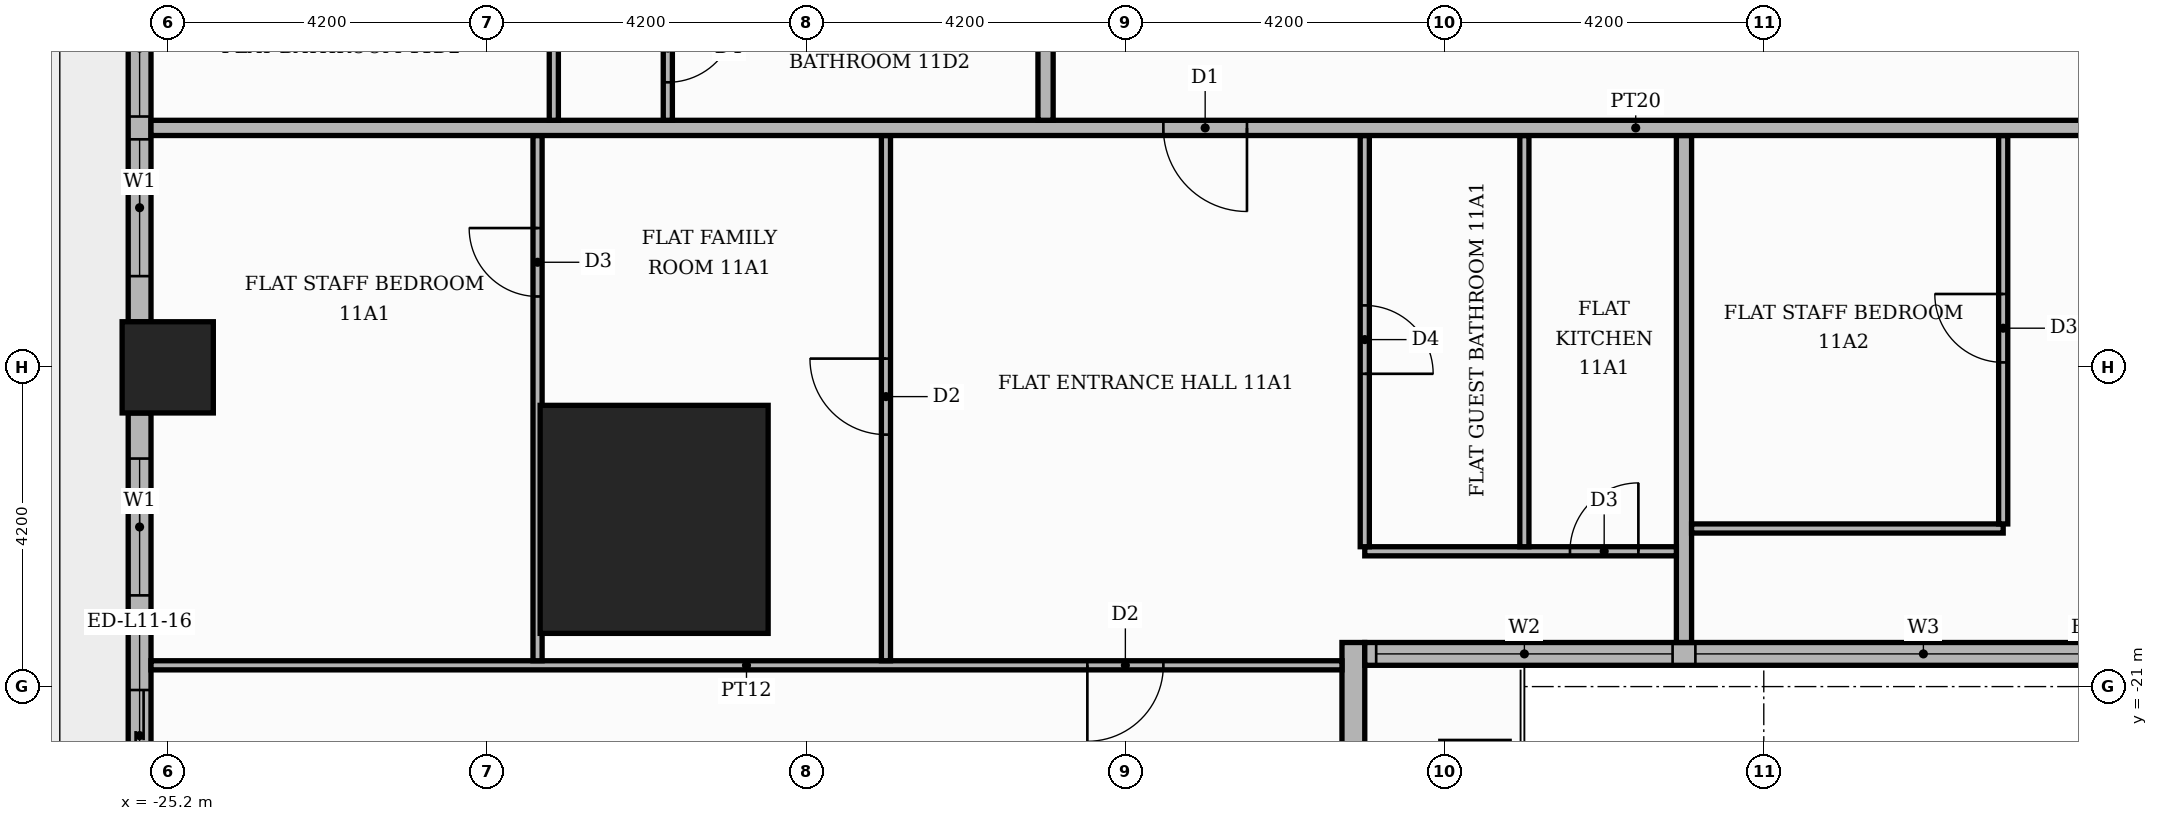
"""IFC4 building model, lengths in metres.
Left out: names, types, materials, properties, quantities, classifications, styles, units other than length and angle.
Written with IfcOpenShell. Run it as: python <this file> out.ifc"""

import sys

from ifc_helpers import new_model, si_unit, direction, frame, frame_2d, origin, origin_2d, place, context, subcontext, project, spatial, rectangle, extrude, element, fill, save


model = new_model("IFC4")
c1 = context("Model", 3, precision=1e-05, world=origin(), true_north=direction((0.0, 1.0)))
c2 = subcontext(c1, "Body", "Model", "MODEL_VIEW")
j1 = project(units=[si_unit("LENGTHUNIT", "METRE"), si_unit("PLANEANGLEUNIT", "RADIAN")], contexts=[c1])
p1 = place(None, origin())
s1 = spatial("IfcSite", under=j1, at=p1, CompositionType="ELEMENT")
p2 = place(p1, origin())
s2 = spatial("IfcBuilding", under=s1, at=p2, CompositionType="ELEMENT")
p3 = place(p2, frame((0.0, 0.0, 50.4)))
s3 = spatial("IfcBuildingStorey", under=s2, at=p3, CompositionType="ELEMENT", Elevation=50.4)
p4 = place(p3, frame((-18.8, -18.8, 0.0), z_axis=(0.0, 0.0, 1.0), x_axis=(1.0, 0.0, 0.0)))
e1 = element("IfcColumn", 1, at=p4, inside=s3, PredefinedType="COLUMN", context=c2, shape_type="SweptSolid", body=[
    extrude(rectangle(XDim=3.0, YDim=3.0, at=origin_2d()), origin(), (0.0, 0.0, 1.0), 3.9),
])
p5 = place(p3, frame((-25.2, -16.8, 0.0), z_axis=(0.0, 0.0, 1.0), x_axis=(1.0, 0.0, 0.0)))
e2 = element("IfcColumn", 2, at=p5, inside=s3, PredefinedType="COLUMN", context=c2, shape_type="SweptSolid", body=[
    extrude(rectangle(XDim=1.2, YDim=1.2, at=origin_2d()), origin(), (0.0, 0.0, 1.0), 3.9),
])
p6 = place(p3, frame((-25.57, -9.0, 0.0), z_axis=(0.0, 0.0, 1.0), x_axis=(0.0, -1.0, 0.0)))
e3 = element("IfcWall", 3, at=p6, inside=s3, PredefinedType="STANDARD", context=c2, shape_type="SweptSolid", body=[
    extrude(rectangle(XDim=7.2, YDim=0.3, at=frame_2d((3.6, 0.0))), origin(), (0.0, 0.0, 1.0), 3.48),
])
p7 = place(p6, frame((0.6, 0.0, 0.9)))
e4 = element("IfcOpeningElement", 4, at=p7, cuts=e3, PredefinedType="OPENING", context=c2, shape_type="SweptSolid", body=[
    extrude(rectangle(XDim=1.8, YDim=2.1, at=frame_2d((0.9, 1.05))), frame((0.0, 0.16, 0.0), z_axis=(0.0, -1.0, 0.0), x_axis=(1.0, 0.0, 0.0)), (0.0, 0.0, 1.0), 0.32),
])
p8 = place(p6, frame((2.7, 0.0, 0.9)))
e5 = element("IfcOpeningElement", 5, at=p8, cuts=e3, PredefinedType="OPENING", context=c2, shape_type="SweptSolid", body=[
    extrude(rectangle(XDim=1.8, YDim=2.1, at=frame_2d((0.9, 1.05))), frame((0.0, 0.16, 0.0), z_axis=(0.0, -1.0, 0.0), x_axis=(1.0, 0.0, 0.0)), (0.0, 0.0, 1.0), 0.32),
])
p9 = place(p6, frame((4.8, 0.0, 0.9)))
e6 = element("IfcOpeningElement", 6, at=p9, cuts=e3, PredefinedType="OPENING", context=c2, shape_type="SweptSolid", body=[
    extrude(rectangle(XDim=1.8, YDim=2.1, at=frame_2d((0.9, 1.05))), frame((0.0, 0.16, 0.0), z_axis=(0.0, -1.0, 0.0), x_axis=(1.0, 0.0, 0.0)), (0.0, 0.0, 1.0), 0.32),
])
p10 = place(p3, frame((-25.57, -17.4, 0.0), z_axis=(0.0, 0.0, 1.0), x_axis=(0.0, -1.0, 0.0)))
e7 = element("IfcWall", 7, at=p10, inside=s3, PredefinedType="STANDARD", context=c2, shape_type="SweptSolid", body=[
    extrude(rectangle(XDim=5.32, YDim=0.3, at=frame_2d((2.66, 0.0))), origin(), (0.0, 0.0, 1.0), 3.48),
])
p11 = place(p10, frame((0.6, 0.0, 0.9)))
e8 = element("IfcOpeningElement", 8, at=p11, cuts=e7, PredefinedType="OPENING", context=c2, shape_type="SweptSolid", body=[
    extrude(rectangle(XDim=1.8, YDim=2.1, at=frame_2d((0.9, 1.05))), frame((0.0, 0.16, 0.0), z_axis=(0.0, -1.0, 0.0), x_axis=(1.0, 0.0, 0.0)), (0.0, 0.0, 1.0), 0.32),
])
p12 = place(p10, frame((3.645, 0.0, 0.0)))
e9 = element("IfcOpeningElement", 9, at=p12, cuts=e7, PredefinedType="OPENING", context=c2, shape_type="SweptSolid", body=[
    extrude(rectangle(XDim=1.2, YDim=2.4, at=frame_2d((0.6, 1.2))), frame((0.0, 0.16, 0.0), z_axis=(0.0, -1.0, 0.0), x_axis=(1.0, 0.0, 0.0)), (0.0, 0.0, 1.0), 0.32),
])
p13 = place(p3, frame((-9.6, -25.42, 0.0), z_axis=(0.0, 0.0, 1.0), x_axis=(0.0, 1.0, 0.0)))
e10 = element("IfcWall", 10, at=p13, inside=s3, PredefinedType="STANDARD", context=c2, shape_type="SweptSolid", body=[
    extrude(rectangle(XDim=5.0, YDim=0.3, at=frame_2d((2.5, 0.0))), origin(), (0.0, 0.0, 1.0), 3.48),
])
p14 = place(p13, frame((1.42, 0.0, 0.0)))
e11 = element("IfcOpeningElement", 11, at=p14, cuts=e10, PredefinedType="OPENING", context=c2, shape_type="SweptSolid", body=[
    extrude(rectangle(XDim=1.8, YDim=2.4, at=frame_2d((0.9, 1.2))), frame((0.0, 0.16, 0.0), z_axis=(0.0, -1.0, 0.0), x_axis=(1.0, 0.0, 0.0)), (0.0, 0.0, 1.0), 0.32),
])
p15 = place(p3, frame((-9.45, -20.57, 0.0), z_axis=(0.0, 0.0, 1.0), x_axis=(1.0, 0.0, 0.0)))
e12 = element("IfcWall", 12, at=p15, inside=s3, PredefinedType="STANDARD", context=c2, shape_type="SweptSolid", body=[
    extrude(rectangle(XDim=19.2, YDim=0.3, at=frame_2d((9.6, 0.0))), origin(), (0.0, 0.0, 1.0), 3.48),
])
p16 = place(p15, frame((0.15, 0.0, 0.9)))
e13 = element("IfcOpeningElement", 13, at=p16, cuts=e12, PredefinedType="OPENING", context=c2, shape_type="SweptSolid", body=[
    extrude(rectangle(XDim=3.9, YDim=2.1, at=frame_2d((1.95, 1.05))), frame((0.0, 0.16, 0.0), z_axis=(0.0, -1.0, 0.0), x_axis=(1.0, 0.0, 0.0)), (0.0, 0.0, 1.0), 0.32),
])
p17 = place(p15, frame((4.35, 0.0, 0.9)))
e14 = element("IfcOpeningElement", 14, at=p17, cuts=e12, PredefinedType="OPENING", context=c2, shape_type="SweptSolid", body=[
    extrude(rectangle(XDim=6.0, YDim=2.1, at=frame_2d((3.0, 1.05))), frame((0.0, 0.16, 0.0), z_axis=(0.0, -1.0, 0.0), x_axis=(1.0, 0.0, 0.0)), (0.0, 0.0, 1.0), 0.32),
])
p18 = place(p15, frame((10.65, 0.0, 0.9)))
e15 = element("IfcOpeningElement", 15, at=p18, cuts=e12, PredefinedType="OPENING", context=c2, shape_type="SweptSolid", body=[
    extrude(rectangle(XDim=6.0, YDim=2.1, at=frame_2d((3.0, 1.05))), frame((0.0, 0.16, 0.0), z_axis=(0.0, -1.0, 0.0), x_axis=(1.0, 0.0, 0.0)), (0.0, 0.0, 1.0), 0.32),
])
p19 = place(p15, frame((16.95, 0.0, 0.9)))
e16 = element("IfcOpeningElement", 16, at=p19, cuts=e12, PredefinedType="OPENING", context=c2, shape_type="SweptSolid", body=[
    extrude(rectangle(XDim=1.8, YDim=2.1, at=frame_2d((0.9, 1.05))), frame((0.0, 0.16, 0.0), z_axis=(0.0, -1.0, 0.0), x_axis=(1.0, 0.0, 0.0)), (0.0, 0.0, 1.0), 0.32),
])
p20 = place(p3, frame((-25.42, -20.72, 0.0), z_axis=(0.0, 0.0, 1.0), x_axis=(1.0, 0.0, 0.0)))
e17 = element("IfcWall", 17, at=p20, inside=s3, PredefinedType="PARTITIONING", context=c2, shape_type="SweptSolid", body=[
    extrude(rectangle(XDim=15.67, YDim=0.12, at=frame_2d((7.835, 0.0))), origin(), (0.0, 0.0, 1.0), 3.48),
])
p21 = place(p20, frame((12.32, 0.0, 0.0)))
e18 = element("IfcOpeningElement", 18, at=p21, cuts=e17, PredefinedType="OPENING", context=c2, shape_type="SweptSolid", body=[
    extrude(rectangle(XDim=1.0, YDim=2.1, at=frame_2d((0.5, 1.05))), frame((0.0, 0.07, 0.0), z_axis=(0.0, -1.0, 0.0), x_axis=(1.0, 0.0, 0.0)), (0.0, 0.0, 1.0), 0.14),
])
p22 = place(p3, frame((-5.25, -20.42, 0.0), z_axis=(0.0, 0.0, 1.0), x_axis=(0.0, 1.0, 0.0)))
e19 = element("IfcWall", 19, at=p22, inside=s3, PredefinedType="PARTITIONING", context=c2, shape_type="SweptSolid", body=[
    extrude(rectangle(XDim=6.67, YDim=0.2, at=frame_2d((3.335, 0.0))), origin(), (0.0, 0.0, 1.0), 3.48),
])
p23 = place(p3, frame((-20.334, -20.66, 0.0), z_axis=(0.0, 0.0, 1.0), x_axis=(0.0, 1.0, 0.0)))
e20 = element("IfcWall", 20, at=p23, inside=s3, PredefinedType="PARTITIONING", context=c2, shape_type="SweptSolid", body=[
    extrude(rectangle(XDim=6.91, YDim=0.12, at=frame_2d((3.455, 0.0))), origin(), (0.0, 0.0, 1.0), 3.48),
])
p24 = place(p23, frame((4.792, 0.0, 0.0)))
e21 = element("IfcOpeningElement", 21, at=p24, cuts=e20, PredefinedType="OPENING", context=c2, shape_type="SweptSolid", body=[
    extrude(rectangle(XDim=0.9, YDim=2.1, at=frame_2d((0.45, 1.05))), frame((0.0, 0.07, 0.0), z_axis=(0.0, -1.0, 0.0), x_axis=(1.0, 0.0, 0.0)), (0.0, 0.0, 1.0), 0.14),
])
p25 = place(p3, frame((-15.75, -20.66, 0.0), z_axis=(0.0, 0.0, 1.0), x_axis=(0.0, 1.0, 0.0)))
e22 = element("IfcWall", 22, at=p25, inside=s3, PredefinedType="PARTITIONING", context=c2, shape_type="SweptSolid", body=[
    extrude(rectangle(XDim=6.91, YDim=0.12, at=frame_2d((3.455, 0.0))), origin(), (0.0, 0.0, 1.0), 3.48),
])
p26 = place(p25, frame((2.975, 0.0, 0.0)))
e23 = element("IfcOpeningElement", 23, at=p26, cuts=e22, PredefinedType="OPENING", context=c2, shape_type="SweptSolid", body=[
    extrude(rectangle(XDim=1.0, YDim=2.1, at=frame_2d((0.5, 1.05))), frame((0.0, 0.07, 0.0), z_axis=(0.0, -1.0, 0.0), x_axis=(1.0, 0.0, 0.0)), (0.0, 0.0, 1.0), 0.14),
])
p27 = place(p3, frame((-9.45, -19.22, 0.0), z_axis=(0.0, 0.0, 1.0), x_axis=(1.0, 0.0, 0.0)))
e24 = element("IfcWall", 24, at=p27, inside=s3, PredefinedType="PARTITIONING", context=c2, shape_type="SweptSolid", body=[
    extrude(rectangle(XDim=4.1, YDim=0.12, at=frame_2d((2.05, 0.0))), origin(), (0.0, 0.0, 1.0), 3.48),
])
p28 = place(p27, frame((2.7, 0.0, 0.0)))
e25 = element("IfcOpeningElement", 25, at=p28, cuts=e24, PredefinedType="OPENING", context=c2, shape_type="SweptSolid", body=[
    extrude(rectangle(XDim=0.9, YDim=2.1, at=frame_2d((0.45, 1.05))), frame((0.0, 0.07, 0.0), z_axis=(0.0, -1.0, 0.0), x_axis=(1.0, 0.0, 0.0)), (0.0, 0.0, 1.0), 0.14),
])
p29 = place(p3, frame((-9.45, -19.16, 0.0), z_axis=(0.0, 0.0, 1.0), x_axis=(0.0, 1.0, 0.0)))
e26 = element("IfcWall", 26, at=p29, inside=s3, PredefinedType="PARTITIONING", context=c2, shape_type="SweptSolid", body=[
    extrude(rectangle(XDim=5.41, YDim=0.12, at=frame_2d((2.705, 0.0))), origin(), (0.0, 0.0, 1.0), 3.48),
])
p30 = place(p29, frame((2.275, 0.0, 0.0)))
e27 = element("IfcOpeningElement", 27, at=p30, cuts=e26, PredefinedType="OPENING", context=c2, shape_type="SweptSolid", body=[
    extrude(rectangle(XDim=0.9, YDim=2.1, at=frame_2d((0.45, 1.05))), frame((0.0, 0.07, 0.0), z_axis=(0.0, -1.0, 0.0), x_axis=(1.0, 0.0, 0.0)), (0.0, 0.0, 1.0), 0.14),
])
p31 = place(p3, frame((-7.35, -19.16, 0.0), z_axis=(0.0, 0.0, 1.0), x_axis=(0.0, 1.0, 0.0)))
e28 = element("IfcWall", 28, at=p31, inside=s3, PredefinedType="PARTITIONING", context=c2, shape_type="SweptSolid", body=[
    extrude(rectangle(XDim=5.41, YDim=0.12, at=frame_2d((2.705, 0.0))), origin(), (0.0, 0.0, 1.0), 3.48),
])
p32 = place(p3, frame((-5.15, -18.92, 0.0), z_axis=(0.0, 0.0, 1.0), x_axis=(1.0, 0.0, 0.0)))
e29 = element("IfcWall", 29, at=p32, inside=s3, PredefinedType="PARTITIONING", context=c2, shape_type="SweptSolid", body=[
    extrude(rectangle(XDim=4.1, YDim=0.12, at=frame_2d((2.05, 0.0))), origin(), (0.0, 0.0, 1.0), 3.48),
])
p33 = place(p3, frame((-1.05, -18.86, 0.0), z_axis=(0.0, 0.0, 1.0), x_axis=(0.0, 1.0, 0.0)))
e30 = element("IfcWall", 30, at=p33, inside=s3, PredefinedType="PARTITIONING", context=c2, shape_type="SweptSolid", body=[
    extrude(rectangle(XDim=5.11, YDim=0.12, at=frame_2d((2.555, 0.0))), origin(), (0.0, 0.0, 1.0), 3.48),
])
p34 = place(p33, frame((2.125, 0.0, 0.0)))
e31 = element("IfcOpeningElement", 31, at=p34, cuts=e30, PredefinedType="OPENING", context=c2, shape_type="SweptSolid", body=[
    extrude(rectangle(XDim=0.9, YDim=2.1, at=frame_2d((0.45, 1.05))), frame((0.0, 0.07, 0.0), z_axis=(0.0, -1.0, 0.0), x_axis=(1.0, 0.0, 0.0)), (0.0, 0.0, 1.0), 0.14),
])
p35 = place(p3, frame((-25.42, -13.65, 0.0), z_axis=(0.0, 0.0, 1.0), x_axis=(1.0, 0.0, 0.0)))
e32 = element("IfcWall", 32, at=p35, inside=s3, PredefinedType="PARTITIONING", context=c2, shape_type="SweptSolid", body=[
    extrude(rectangle(XDim=39.07, YDim=0.2, at=frame_2d((19.535, 0.0))), origin(), (0.0, 0.0, 1.0), 3.48),
])
p36 = place(p35, frame((13.32, 0.0, 0.0)))
e33 = element("IfcOpeningElement", 33, at=p36, cuts=e32, PredefinedType="OPENING", context=c2, shape_type="SweptSolid", body=[
    extrude(rectangle(XDim=1.1, YDim=2.4, at=frame_2d((0.55, 1.2))), frame((0.0, 0.11, 0.0), z_axis=(0.0, -1.0, 0.0), x_axis=(1.0, 0.0, 0.0)), (0.0, 0.0, 1.0), 0.22),
])
p37 = place(p35, frame((25.92, 0.0, 0.0)))
e34 = element("IfcOpeningElement", 34, at=p37, cuts=e32, PredefinedType="OPENING", context=c2, shape_type="SweptSolid", body=[
    extrude(rectangle(XDim=1.1, YDim=2.4, at=frame_2d((0.55, 1.2))), frame((0.0, 0.11, 0.0), z_axis=(0.0, -1.0, 0.0), x_axis=(1.0, 0.0, 0.0)), (0.0, 0.0, 1.0), 0.22),
])
p38 = place(p3, frame((-20.12, -13.55, 0.0), z_axis=(0.0, 0.0, 1.0), x_axis=(0.0, 1.0, 0.0)))
e35 = element("IfcWall", 35, at=p38, inside=s3, PredefinedType="PARTITIONING", context=c2, shape_type="SweptSolid", body=[
    extrude(rectangle(XDim=1.94, YDim=0.12, at=frame_2d((0.97, 0.0))), origin(), (0.0, 0.0, 1.0), 3.48),
])
p39 = place(p3, frame((-18.62, -13.55, 0.0), z_axis=(0.0, 0.0, 1.0), x_axis=(0.0, 1.0, 0.0)))
e36 = element("IfcWall", 36, at=p39, inside=s3, PredefinedType="PARTITIONING", context=c2, shape_type="SweptSolid", body=[
    extrude(rectangle(XDim=1.94, YDim=0.12, at=frame_2d((0.97, 0.0))), origin(), (0.0, 0.0, 1.0), 3.48),
])
p40 = place(p39, frame((0.5, 0.0, 0.0)))
e37 = element("IfcOpeningElement", 37, at=p40, cuts=e36, PredefinedType="OPENING", context=c2, shape_type="SweptSolid", body=[
    extrude(rectangle(XDim=0.9, YDim=2.1, at=frame_2d((0.45, 1.05))), frame((0.0, 0.07, 0.0), z_axis=(0.0, -1.0, 0.0), x_axis=(1.0, 0.0, 0.0)), (0.0, 0.0, 1.0), 0.14),
])
p41 = place(p3, frame((-13.65, -13.55, 0.0), z_axis=(0.0, 0.0, 1.0), x_axis=(0.0, 1.0, 0.0)))
e38 = element("IfcWall", 38, at=p41, inside=s3, PredefinedType="PARTITIONING", context=c2, shape_type="SweptSolid", body=[
    extrude(rectangle(XDim=18.7, YDim=0.2, at=frame_2d((9.35, 0.0))), origin(), (0.0, 0.0, 1.0), 3.48),
])
p42 = place(p41, frame((11.95, 0.0, 0.0)))
e39 = element("IfcOpeningElement", 39, at=p42, cuts=e38, PredefinedType="OPENING", context=c2, shape_type="SweptSolid", body=[
    extrude(rectangle(XDim=1.1, YDim=2.4, at=frame_2d((0.55, 1.2))), frame((0.0, 0.11, 0.0), z_axis=(0.0, -1.0, 0.0), x_axis=(1.0, 0.0, 0.0)), (0.0, 0.0, 1.0), 0.22),
])
p43 = place(p8, origin())
e40 = element("IfcWindow", 40, at=p43, inside=s3, PartitioningType="SINGLE_PANEL", PredefinedType="WINDOW", context=c2, shape_type="SweptSolid", body=[
    extrude(rectangle(XDim=1.8, YDim=2.1, at=frame_2d((0.9, 1.05))), frame((0.0, 0.03, 0.0), z_axis=(0.0, -1.0, 0.0), x_axis=(1.0, 0.0, 0.0)), (0.0, 0.0, 1.0), 0.06),
])
fill(e5, e40)
p44 = place(p9, origin())
e41 = element("IfcWindow", 41, at=p44, inside=s3, PartitioningType="SINGLE_PANEL", PredefinedType="WINDOW", context=c2, shape_type="SweptSolid", body=[
    extrude(rectangle(XDim=1.8, YDim=2.1, at=frame_2d((0.9, 1.05))), frame((0.0, 0.03, 0.0), z_axis=(0.0, -1.0, 0.0), x_axis=(1.0, 0.0, 0.0)), (0.0, 0.0, 1.0), 0.06),
])
fill(e6, e41)
p45 = place(p11, origin())
e42 = element("IfcWindow", 42, at=p45, inside=s3, PartitioningType="SINGLE_PANEL", PredefinedType="WINDOW", context=c2, shape_type="SweptSolid", body=[
    extrude(rectangle(XDim=1.8, YDim=2.1, at=frame_2d((0.9, 1.05))), frame((0.0, 0.03, 0.0), z_axis=(0.0, -1.0, 0.0), x_axis=(1.0, 0.0, 0.0)), (0.0, 0.0, 1.0), 0.06),
])
fill(e8, e42)
p46 = place(p12, origin())
e43 = element("IfcDoor", 43, at=p46, inside=s3, OperationType="SLIDING_TO_RIGHT", PredefinedType="DOOR", context=c2, shape_type="SweptSolid", body=[
    extrude(rectangle(XDim=1.2, YDim=2.4, at=frame_2d((0.6, 1.2))), frame((0.0, 0.025, 0.0), z_axis=(0.0, -1.0, 0.0), x_axis=(1.0, 0.0, 0.0)), (0.0, 0.0, 1.0), 0.05),
])
fill(e9, e43)
p47 = place(p16, origin())
e44 = element("IfcWindow", 44, at=p47, inside=s3, PartitioningType="SINGLE_PANEL", PredefinedType="WINDOW", context=c2, shape_type="SweptSolid", body=[
    extrude(rectangle(XDim=3.9, YDim=2.1, at=frame_2d((1.95, 1.05))), frame((0.0, 0.03, 0.0), z_axis=(0.0, -1.0, 0.0), x_axis=(1.0, 0.0, 0.0)), (0.0, 0.0, 1.0), 0.06),
])
fill(e13, e44)
p48 = place(p17, origin())
e45 = element("IfcWindow", 45, at=p48, inside=s3, PartitioningType="SINGLE_PANEL", PredefinedType="WINDOW", context=c2, shape_type="SweptSolid", body=[
    extrude(rectangle(XDim=6.0, YDim=2.1, at=frame_2d((3.0, 1.05))), frame((0.0, 0.03, 0.0), z_axis=(0.0, -1.0, 0.0), x_axis=(1.0, 0.0, 0.0)), (0.0, 0.0, 1.0), 0.06),
])
fill(e14, e45)
p49 = place(p36, frame((1.1, 0.0, 0.0), z_axis=(0.0, 0.0, 1.0), x_axis=(-1.0, 0.0, 0.0)))
e46 = element("IfcDoor", 46, at=p49, inside=s3, OperationType="SINGLE_SWING_RIGHT", PredefinedType="DOOR", context=c2, shape_type="SweptSolid", body=[
    extrude(rectangle(XDim=1.1, YDim=2.4, at=frame_2d((0.55, 1.2))), frame((0.0, 0.025, 0.0), z_axis=(0.0, -1.0, 0.0), x_axis=(1.0, 0.0, 0.0)), (0.0, 0.0, 1.0), 0.05),
])
fill(e33, e46)
p50 = place(p24, origin())
e47 = element("IfcDoor", 47, at=p50, inside=s3, OperationType="SINGLE_SWING_RIGHT", PredefinedType="DOOR", context=c2, shape_type="SweptSolid", body=[
    extrude(rectangle(XDim=0.9, YDim=2.1, at=frame_2d((0.45, 1.05))), frame((0.0, 0.025, 0.0), z_axis=(0.0, -1.0, 0.0), x_axis=(1.0, 0.0, 0.0)), (0.0, 0.0, 1.0), 0.05),
])
fill(e21, e47)
p51 = place(p26, origin())
e48 = element("IfcDoor", 48, at=p51, inside=s3, OperationType="SINGLE_SWING_RIGHT", PredefinedType="DOOR", context=c2, shape_type="SweptSolid", body=[
    extrude(rectangle(XDim=1.0, YDim=2.1, at=frame_2d((0.5, 1.05))), frame((0.0, 0.025, 0.0), z_axis=(0.0, -1.0, 0.0), x_axis=(1.0, 0.0, 0.0)), (0.0, 0.0, 1.0), 0.05),
])
fill(e23, e48)
p52 = place(p30, frame((0.9, 0.0, 0.0), z_axis=(0.0, 0.0, 1.0), x_axis=(-1.0, 0.0, 0.0)))
e49 = element("IfcDoor", 49, at=p52, inside=s3, OperationType="SINGLE_SWING_LEFT", PredefinedType="DOOR", context=c2, shape_type="SweptSolid", body=[
    extrude(rectangle(XDim=0.9, YDim=2.1, at=frame_2d((0.45, 1.05))), frame((0.0, 0.025, 0.0), z_axis=(0.0, -1.0, 0.0), x_axis=(1.0, 0.0, 0.0)), (0.0, 0.0, 1.0), 0.05),
])
fill(e27, e49)
p53 = place(p28, origin())
e50 = element("IfcDoor", 50, at=p53, inside=s3, OperationType="SINGLE_SWING_RIGHT", PredefinedType="DOOR", context=c2, shape_type="SweptSolid", body=[
    extrude(rectangle(XDim=0.9, YDim=2.1, at=frame_2d((0.45, 1.05))), frame((0.0, 0.025, 0.0), z_axis=(0.0, -1.0, 0.0), x_axis=(1.0, 0.0, 0.0)), (0.0, 0.0, 1.0), 0.05),
])
fill(e25, e50)
p54 = place(p21, frame((1.0, 0.0, 0.0), z_axis=(0.0, 0.0, 1.0), x_axis=(-1.0, 0.0, 0.0)))
e51 = element("IfcDoor", 51, at=p54, inside=s3, OperationType="SINGLE_SWING_LEFT", PredefinedType="DOOR", context=c2, shape_type="SweptSolid", body=[
    extrude(rectangle(XDim=1.0, YDim=2.1, at=frame_2d((0.5, 1.05))), frame((0.0, 0.025, 0.0), z_axis=(0.0, -1.0, 0.0), x_axis=(1.0, 0.0, 0.0)), (0.0, 0.0, 1.0), 0.05),
])
fill(e18, e51)
p55 = place(p34, origin())
e52 = element("IfcDoor", 52, at=p55, inside=s3, OperationType="SINGLE_SWING_RIGHT", PredefinedType="DOOR", context=c2, shape_type="SweptSolid", body=[
    extrude(rectangle(XDim=0.9, YDim=2.1, at=frame_2d((0.45, 1.05))), frame((0.0, 0.025, 0.0), z_axis=(0.0, -1.0, 0.0), x_axis=(1.0, 0.0, 0.0)), (0.0, 0.0, 1.0), 0.05),
])
fill(e31, e52)
p56 = place(p40, frame((0.9, 0.0, 0.0), z_axis=(0.0, 0.0, 1.0), x_axis=(-1.0, 0.0, 0.0)))
e53 = element("IfcDoor", 53, at=p56, inside=s3, OperationType="SINGLE_SWING_RIGHT", PredefinedType="DOOR", context=c2, shape_type="SweptSolid", body=[
    extrude(rectangle(XDim=0.9, YDim=2.1, at=frame_2d((0.45, 1.05))), frame((0.0, 0.025, 0.0), z_axis=(0.0, -1.0, 0.0), x_axis=(1.0, 0.0, 0.0)), (0.0, 0.0, 1.0), 0.05),
])
fill(e37, e53)
save(model, sys.argv[1])
